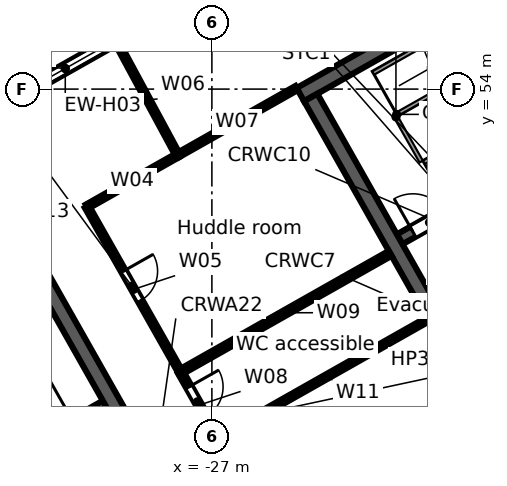
"""IFC4 building model, lengths in metres.
Left out: names, types, materials, properties, quantities, classifications, styles, units other than length and angle.
Written with IfcOpenShell. Run it as: python <this file> out.ifc"""

import sys

from ifc_helpers import new_model, si_unit, direction, frame, frame_2d, origin, place, context, subcontext, project, spatial, rectangle, extrude, element, fill, save


model = new_model("IFC4")
c1 = context("Model", 3, precision=1e-05, world=origin(), true_north=direction((0.0, 1.0)))
c2 = subcontext(c1, "Body", "Model", "MODEL_VIEW")
j1 = project(units=[si_unit("LENGTHUNIT", "METRE"), si_unit("PLANEANGLEUNIT", "RADIAN")], contexts=[c1])
p1 = place(None, origin())
s1 = spatial("IfcSite", under=j1, at=p1, CompositionType="ELEMENT")
p2 = place(p1, origin())
s2 = spatial("IfcBuilding", under=s1, at=p2, CompositionType="ELEMENT")
p3 = place(p2, frame((0.0, 0.0, 281.7)))
s3 = spatial("IfcBuildingStorey", under=s2, at=p3, CompositionType="ELEMENT", Elevation=281.7)
p4 = place(p3, frame((-58.732, 38.771, 0.0), z_axis=(0.0, 0.0, 1.0), x_axis=(0.870355615581, 0.492423702137, 0.0)))
e1 = element("IfcWall", 1, at=p4, inside=s3, PredefinedType="STANDARD", context=c2, shape_type="SweptSolid", body=[
    extrude(rectangle(XDim=64.052, YDim=0.25, at=frame_2d((32.026, 0.0))), origin(), (0.0, 0.0, 1.0), 3.45),
])
p5 = place(p4, frame((61.259, 0.0, 0.8)))
e2 = element("IfcOpeningElement", 2, at=p5, cuts=e1, PredefinedType="OPENING", context=c2, shape_type="SweptSolid", body=[
    extrude(rectangle(XDim=2.4, YDim=2.2, at=frame_2d((1.2, 1.1))), frame((0.0, 0.135, 0.0), z_axis=(0.0, -1.0, 0.0), x_axis=(1.0, 0.0, 0.0)), (0.0, 0.0, 1.0), 0.27),
])
p6 = place(p4, frame((58.216, 0.0, 0.8)))
e3 = element("IfcOpeningElement", 3, at=p6, cuts=e1, PredefinedType="OPENING", context=c2, shape_type="SweptSolid", body=[
    extrude(rectangle(XDim=2.4, YDim=2.2, at=frame_2d((1.2, 1.1))), frame((0.0, 0.135, 0.0), z_axis=(0.0, -1.0, 0.0), x_axis=(1.0, 0.0, 0.0)), (0.0, 0.0, 1.0), 0.27),
])
p7 = place(p4, frame((55.173, 0.0, 0.8)))
e4 = element("IfcOpeningElement", 4, at=p7, cuts=e1, PredefinedType="OPENING", context=c2, shape_type="SweptSolid", body=[
    extrude(rectangle(XDim=2.4, YDim=2.2, at=frame_2d((1.2, 1.1))), frame((0.0, 0.135, 0.0), z_axis=(0.0, -1.0, 0.0), x_axis=(1.0, 0.0, 0.0)), (0.0, 0.0, 1.0), 0.27),
])
p8 = place(p4, frame((52.129, 0.0, 0.8)))
e5 = element("IfcOpeningElement", 5, at=p8, cuts=e1, PredefinedType="OPENING", context=c2, shape_type="SweptSolid", body=[
    extrude(rectangle(XDim=2.4, YDim=2.2, at=frame_2d((1.2, 1.1))), frame((0.0, 0.135, 0.0), z_axis=(0.0, -1.0, 0.0), x_axis=(1.0, 0.0, 0.0)), (0.0, 0.0, 1.0), 0.27),
])
p9 = place(p4, frame((49.086, 0.0, 0.8)))
e6 = element("IfcOpeningElement", 6, at=p9, cuts=e1, PredefinedType="OPENING", context=c2, shape_type="SweptSolid", body=[
    extrude(rectangle(XDim=2.4, YDim=2.2, at=frame_2d((1.2, 1.1))), frame((0.0, 0.135, 0.0), z_axis=(0.0, -1.0, 0.0), x_axis=(1.0, 0.0, 0.0)), (0.0, 0.0, 1.0), 0.27),
])
p10 = place(p4, frame((46.043, 0.0, 0.8)))
e7 = element("IfcOpeningElement", 7, at=p10, cuts=e1, PredefinedType="OPENING", context=c2, shape_type="SweptSolid", body=[
    extrude(rectangle(XDim=2.4, YDim=2.2, at=frame_2d((1.2, 1.1))), frame((0.0, 0.135, 0.0), z_axis=(0.0, -1.0, 0.0), x_axis=(1.0, 0.0, 0.0)), (0.0, 0.0, 1.0), 0.27),
])
p11 = place(p4, frame((43.0, 0.0, 0.8)))
e8 = element("IfcOpeningElement", 8, at=p11, cuts=e1, PredefinedType="OPENING", context=c2, shape_type="SweptSolid", body=[
    extrude(rectangle(XDim=2.4, YDim=2.2, at=frame_2d((1.2, 1.1))), frame((0.0, 0.135, 0.0), z_axis=(0.0, -1.0, 0.0), x_axis=(1.0, 0.0, 0.0)), (0.0, 0.0, 1.0), 0.27),
])
p12 = place(p4, frame((39.956, 0.0, 0.8)))
e9 = element("IfcOpeningElement", 9, at=p12, cuts=e1, PredefinedType="OPENING", context=c2, shape_type="SweptSolid", body=[
    extrude(rectangle(XDim=2.4, YDim=2.2, at=frame_2d((1.2, 1.1))), frame((0.0, 0.135, 0.0), z_axis=(0.0, -1.0, 0.0), x_axis=(1.0, 0.0, 0.0)), (0.0, 0.0, 1.0), 0.27),
])
p13 = place(p4, frame((36.913, 0.0, 0.8)))
e10 = element("IfcOpeningElement", 10, at=p13, cuts=e1, PredefinedType="OPENING", context=c2, shape_type="SweptSolid", body=[
    extrude(rectangle(XDim=2.4, YDim=2.2, at=frame_2d((1.2, 1.1))), frame((0.0, 0.135, 0.0), z_axis=(0.0, -1.0, 0.0), x_axis=(1.0, 0.0, 0.0)), (0.0, 0.0, 1.0), 0.27),
])
p14 = place(p4, frame((33.87, 0.0, 0.8)))
e11 = element("IfcOpeningElement", 11, at=p14, cuts=e1, PredefinedType="OPENING", context=c2, shape_type="SweptSolid", body=[
    extrude(rectangle(XDim=2.4, YDim=2.2, at=frame_2d((1.2, 1.1))), frame((0.0, 0.135, 0.0), z_axis=(0.0, -1.0, 0.0), x_axis=(1.0, 0.0, 0.0)), (0.0, 0.0, 1.0), 0.27),
])
p15 = place(p4, frame((30.826, 0.0, 0.8)))
e12 = element("IfcOpeningElement", 12, at=p15, cuts=e1, PredefinedType="OPENING", context=c2, shape_type="SweptSolid", body=[
    extrude(rectangle(XDim=2.4, YDim=2.2, at=frame_2d((1.2, 1.1))), frame((0.0, 0.135, 0.0), z_axis=(0.0, -1.0, 0.0), x_axis=(1.0, 0.0, 0.0)), (0.0, 0.0, 1.0), 0.27),
])
p16 = place(p4, frame((27.783, 0.0, 0.8)))
e13 = element("IfcOpeningElement", 13, at=p16, cuts=e1, PredefinedType="OPENING", context=c2, shape_type="SweptSolid", body=[
    extrude(rectangle(XDim=2.4, YDim=2.2, at=frame_2d((1.2, 1.1))), frame((0.0, 0.135, 0.0), z_axis=(0.0, -1.0, 0.0), x_axis=(1.0, 0.0, 0.0)), (0.0, 0.0, 1.0), 0.27),
])
p17 = place(p4, frame((24.74, 0.0, 0.8)))
e14 = element("IfcOpeningElement", 14, at=p17, cuts=e1, PredefinedType="OPENING", context=c2, shape_type="SweptSolid", body=[
    extrude(rectangle(XDim=2.4, YDim=2.2, at=frame_2d((1.2, 1.1))), frame((0.0, 0.135, 0.0), z_axis=(0.0, -1.0, 0.0), x_axis=(1.0, 0.0, 0.0)), (0.0, 0.0, 1.0), 0.27),
])
p18 = place(p4, frame((21.696, 0.0, 0.8)))
e15 = element("IfcOpeningElement", 15, at=p18, cuts=e1, PredefinedType="OPENING", context=c2, shape_type="SweptSolid", body=[
    extrude(rectangle(XDim=2.4, YDim=2.2, at=frame_2d((1.2, 1.1))), frame((0.0, 0.135, 0.0), z_axis=(0.0, -1.0, 0.0), x_axis=(1.0, 0.0, 0.0)), (0.0, 0.0, 1.0), 0.27),
])
p19 = place(p4, frame((18.653, 0.0, 0.8)))
e16 = element("IfcOpeningElement", 16, at=p19, cuts=e1, PredefinedType="OPENING", context=c2, shape_type="SweptSolid", body=[
    extrude(rectangle(XDim=2.4, YDim=2.2, at=frame_2d((1.2, 1.1))), frame((0.0, 0.135, 0.0), z_axis=(0.0, -1.0, 0.0), x_axis=(1.0, 0.0, 0.0)), (0.0, 0.0, 1.0), 0.27),
])
p20 = place(p4, frame((15.61, 0.0, 0.8)))
e17 = element("IfcOpeningElement", 17, at=p20, cuts=e1, PredefinedType="OPENING", context=c2, shape_type="SweptSolid", body=[
    extrude(rectangle(XDim=2.4, YDim=2.2, at=frame_2d((1.2, 1.1))), frame((0.0, 0.135, 0.0), z_axis=(0.0, -1.0, 0.0), x_axis=(1.0, 0.0, 0.0)), (0.0, 0.0, 1.0), 0.27),
])
p21 = place(p4, frame((12.567, 0.0, 0.8)))
e18 = element("IfcOpeningElement", 18, at=p21, cuts=e1, PredefinedType="OPENING", context=c2, shape_type="SweptSolid", body=[
    extrude(rectangle(XDim=2.4, YDim=2.2, at=frame_2d((1.2, 1.1))), frame((0.0, 0.135, 0.0), z_axis=(0.0, -1.0, 0.0), x_axis=(1.0, 0.0, 0.0)), (0.0, 0.0, 1.0), 0.27),
])
p22 = place(p4, frame((9.523, 0.0, 0.8)))
e19 = element("IfcOpeningElement", 19, at=p22, cuts=e1, PredefinedType="OPENING", context=c2, shape_type="SweptSolid", body=[
    extrude(rectangle(XDim=2.4, YDim=2.2, at=frame_2d((1.2, 1.1))), frame((0.0, 0.135, 0.0), z_axis=(0.0, -1.0, 0.0), x_axis=(1.0, 0.0, 0.0)), (0.0, 0.0, 1.0), 0.27),
])
p23 = place(p4, frame((6.48, 0.0, 0.8)))
e20 = element("IfcOpeningElement", 20, at=p23, cuts=e1, PredefinedType="OPENING", context=c2, shape_type="SweptSolid", body=[
    extrude(rectangle(XDim=2.4, YDim=2.2, at=frame_2d((1.2, 1.1))), frame((0.0, 0.135, 0.0), z_axis=(0.0, -1.0, 0.0), x_axis=(1.0, 0.0, 0.0)), (0.0, 0.0, 1.0), 0.27),
])
p24 = place(p4, frame((3.437, 0.0, 0.8)))
e21 = element("IfcOpeningElement", 21, at=p24, cuts=e1, PredefinedType="OPENING", context=c2, shape_type="SweptSolid", body=[
    extrude(rectangle(XDim=2.4, YDim=2.2, at=frame_2d((1.2, 1.1))), frame((0.0, 0.135, 0.0), z_axis=(0.0, -1.0, 0.0), x_axis=(1.0, 0.0, 0.0)), (0.0, 0.0, 1.0), 0.27),
])
p25 = place(p4, frame((0.393, 0.0, 0.8)))
e22 = element("IfcOpeningElement", 22, at=p25, cuts=e1, PredefinedType="OPENING", context=c2, shape_type="SweptSolid", body=[
    extrude(rectangle(XDim=2.4, YDim=2.2, at=frame_2d((1.2, 1.1))), frame((0.0, 0.135, 0.0), z_axis=(0.0, -1.0, 0.0), x_axis=(1.0, 0.0, 0.0)), (0.0, 0.0, 1.0), 0.27),
])
p26 = place(p3, frame((-3.017, 46.293, 0.0), z_axis=(0.0, 0.0, 1.0), x_axis=(-0.870355474887, -0.492423950812, 0.0)))
e23 = element("IfcWall", 23, at=p26, inside=s3, PredefinedType="STANDARD", context=c2, shape_type="SweptSolid", body=[
    extrude(rectangle(XDim=40.34, YDim=0.25, at=frame_2d((20.17, 0.0))), origin(), (0.0, 0.0, 1.0), 3.45),
])
p27 = place(p26, frame((37.428, 0.0, 0.8)))
e24 = element("IfcOpeningElement", 24, at=p27, cuts=e23, PredefinedType="OPENING", context=c2, shape_type="SweptSolid", body=[
    extrude(rectangle(XDim=2.4, YDim=2.2, at=frame_2d((1.2, 1.1))), frame((0.0, 0.135, 0.0), z_axis=(0.0, -1.0, 0.0), x_axis=(1.0, 0.0, 0.0)), (0.0, 0.0, 1.0), 0.27),
])
p28 = place(p26, frame((34.372, 0.0, 0.0)))
e25 = element("IfcOpeningElement", 25, at=p28, cuts=e23, PredefinedType="OPENING", context=c2, shape_type="SweptSolid", body=[
    extrude(rectangle(XDim=1.8, YDim=2.4, at=frame_2d((0.9, 1.2))), frame((0.0, 0.135, 0.0), z_axis=(0.0, -1.0, 0.0), x_axis=(1.0, 0.0, 0.0)), (0.0, 0.0, 1.0), 0.27),
])
p29 = place(p26, frame((30.716, 0.0, 0.8)))
e26 = element("IfcOpeningElement", 26, at=p29, cuts=e23, PredefinedType="OPENING", context=c2, shape_type="SweptSolid", body=[
    extrude(rectangle(XDim=2.4, YDim=2.2, at=frame_2d((1.2, 1.1))), frame((0.0, 0.135, 0.0), z_axis=(0.0, -1.0, 0.0), x_axis=(1.0, 0.0, 0.0)), (0.0, 0.0, 1.0), 0.27),
])
p30 = place(p26, frame((27.36, 0.0, 0.8)))
e27 = element("IfcOpeningElement", 27, at=p30, cuts=e23, PredefinedType="OPENING", context=c2, shape_type="SweptSolid", body=[
    extrude(rectangle(XDim=2.4, YDim=2.2, at=frame_2d((1.2, 1.1))), frame((0.0, 0.135, 0.0), z_axis=(0.0, -1.0, 0.0), x_axis=(1.0, 0.0, 0.0)), (0.0, 0.0, 1.0), 0.27),
])
p31 = place(p26, frame((24.304, 0.0, 0.0)))
e28 = element("IfcOpeningElement", 28, at=p31, cuts=e23, PredefinedType="OPENING", context=c2, shape_type="SweptSolid", body=[
    extrude(rectangle(XDim=1.8, YDim=2.4, at=frame_2d((0.9, 1.2))), frame((0.0, 0.135, 0.0), z_axis=(0.0, -1.0, 0.0), x_axis=(1.0, 0.0, 0.0)), (0.0, 0.0, 1.0), 0.27),
])
p32 = place(p26, frame((20.648, 0.0, 0.8)))
e29 = element("IfcOpeningElement", 29, at=p32, cuts=e23, PredefinedType="OPENING", context=c2, shape_type="SweptSolid", body=[
    extrude(rectangle(XDim=2.4, YDim=2.2, at=frame_2d((1.2, 1.1))), frame((0.0, 0.135, 0.0), z_axis=(0.0, -1.0, 0.0), x_axis=(1.0, 0.0, 0.0)), (0.0, 0.0, 1.0), 0.27),
])
p33 = place(p26, frame((17.292, 0.0, 0.8)))
e30 = element("IfcOpeningElement", 30, at=p33, cuts=e23, PredefinedType="OPENING", context=c2, shape_type="SweptSolid", body=[
    extrude(rectangle(XDim=2.4, YDim=2.2, at=frame_2d((1.2, 1.1))), frame((0.0, 0.135, 0.0), z_axis=(0.0, -1.0, 0.0), x_axis=(1.0, 0.0, 0.0)), (0.0, 0.0, 1.0), 0.27),
])
p34 = place(p26, frame((14.236, 0.0, 0.0)))
e31 = element("IfcOpeningElement", 31, at=p34, cuts=e23, PredefinedType="OPENING", context=c2, shape_type="SweptSolid", body=[
    extrude(rectangle(XDim=1.8, YDim=2.4, at=frame_2d((0.9, 1.2))), frame((0.0, 0.135, 0.0), z_axis=(0.0, -1.0, 0.0), x_axis=(1.0, 0.0, 0.0)), (0.0, 0.0, 1.0), 0.27),
])
p35 = place(p26, frame((10.58, 0.0, 0.8)))
e32 = element("IfcOpeningElement", 32, at=p35, cuts=e23, PredefinedType="OPENING", context=c2, shape_type="SweptSolid", body=[
    extrude(rectangle(XDim=2.4, YDim=2.2, at=frame_2d((1.2, 1.1))), frame((0.0, 0.135, 0.0), z_axis=(0.0, -1.0, 0.0), x_axis=(1.0, 0.0, 0.0)), (0.0, 0.0, 1.0), 0.27),
])
p36 = place(p26, frame((7.224, 0.0, 0.8)))
e33 = element("IfcOpeningElement", 33, at=p36, cuts=e23, PredefinedType="OPENING", context=c2, shape_type="SweptSolid", body=[
    extrude(rectangle(XDim=2.4, YDim=2.2, at=frame_2d((1.2, 1.1))), frame((0.0, 0.135, 0.0), z_axis=(0.0, -1.0, 0.0), x_axis=(1.0, 0.0, 0.0)), (0.0, 0.0, 1.0), 0.27),
])
p37 = place(p26, frame((4.168, 0.0, 0.0)))
e34 = element("IfcOpeningElement", 34, at=p37, cuts=e23, PredefinedType="OPENING", context=c2, shape_type="SweptSolid", body=[
    extrude(rectangle(XDim=1.8, YDim=2.4, at=frame_2d((0.9, 1.2))), frame((0.0, 0.135, 0.0), z_axis=(0.0, -1.0, 0.0), x_axis=(1.0, 0.0, 0.0)), (0.0, 0.0, 1.0), 0.27),
])
p38 = place(p26, frame((0.512, 0.0, 0.8)))
e35 = element("IfcOpeningElement", 35, at=p38, cuts=e23, PredefinedType="OPENING", context=c2, shape_type="SweptSolid", body=[
    extrude(rectangle(XDim=2.4, YDim=2.2, at=frame_2d((1.2, 1.1))), frame((0.0, 0.135, 0.0), z_axis=(0.0, -1.0, 0.0), x_axis=(1.0, 0.0, 0.0)), (0.0, 0.0, 1.0), 0.27),
])
p39 = place(p3, frame((-37.282, 41.435, 0.0), z_axis=(0.0, 0.0, 1.0), x_axis=(0.870361315115, 0.492413628113, 0.0)))
e36 = element("IfcWall", 36, at=p39, inside=s3, PredefinedType="SOLIDWALL", context=c2, shape_type="SweptSolid", body=[
    extrude(rectangle(XDim=8.6, YDim=0.3, at=frame_2d((4.3, 0.0))), origin(), (0.0, 0.0, 1.0), 3.45),
])
p40 = place(p39, frame((0.65, 0.0, 0.0)))
e37 = element("IfcOpeningElement", 37, at=p40, cuts=e36, PredefinedType="OPENING", context=c2, shape_type="SweptSolid", body=[
    extrude(rectangle(XDim=1.1, YDim=2.1, at=frame_2d((0.55, 1.05))), frame((0.0, 0.16, 0.0), z_axis=(0.0, -1.0, 0.0), x_axis=(1.0, 0.0, 0.0)), (0.0, 0.0, 1.0), 0.32),
])
p41 = place(p39, frame((3.05, 0.0, 0.0)))
e38 = element("IfcOpeningElement", 38, at=p41, cuts=e36, PredefinedType="OPENING", context=c2, shape_type="SweptSolid", body=[
    extrude(rectangle(XDim=1.1, YDim=2.1, at=frame_2d((0.55, 1.05))), frame((0.0, 0.16, 0.0), z_axis=(0.0, -1.0, 0.0), x_axis=(1.0, 0.0, 0.0)), (0.0, 0.0, 1.0), 0.32),
])
p42 = place(p39, frame((6.2, 0.0, 0.0)))
e39 = element("IfcOpeningElement", 39, at=p42, cuts=e36, PredefinedType="OPENING", context=c2, shape_type="SweptSolid", body=[
    extrude(rectangle(XDim=1.1, YDim=2.1, at=frame_2d((0.55, 1.05))), frame((0.0, 0.16, 0.0), z_axis=(0.0, -1.0, 0.0), x_axis=(1.0, 0.0, 0.0)), (0.0, 0.0, 1.0), 0.32),
])
p43 = place(p3, frame((-31.79, 49.597, 0.0), z_axis=(0.0, 0.0, 1.0), x_axis=(0.492421663121, -0.870356769198, 0.0)))
e40 = element("IfcWall", 40, at=p43, inside=s3, PredefinedType="SOLIDWALL", context=c2, shape_type="SweptSolid", body=[
    extrude(rectangle(XDim=13.2, YDim=0.4, at=frame_2d((6.6, 0.0))), origin(), (0.0, 0.0, 1.0), 3.45),
])
p44 = place(p3, frame((-22.059, 50.047, 0.0), z_axis=(0.0, 0.0, 1.0), x_axis=(0.87035077051, 0.49243226567, 0.0)))
e41 = element("IfcWall", 41, at=p44, inside=s3, PredefinedType="SOLIDWALL", context=c2, shape_type="SweptSolid", body=[
    extrude(rectangle(XDim=7.4, YDim=0.3, at=frame_2d((3.7, 0.0))), origin(), (0.0, 0.0, 1.0), 3.45),
])
p45 = place(p44, frame((0.4, 0.0, 0.0)))
e42 = element("IfcOpeningElement", 42, at=p45, cuts=e41, PredefinedType="OPENING", context=c2, shape_type="SweptSolid", body=[
    extrude(rectangle(XDim=1.0, YDim=2.1, at=frame_2d((0.5, 1.05))), frame((0.0, 0.16, 0.0), z_axis=(0.0, -1.0, 0.0), x_axis=(1.0, 0.0, 0.0)), (0.0, 0.0, 1.0), 0.32),
])
p46 = place(p3, frame((-24.672, 53.854, 0.0), z_axis=(0.0, 0.0, 1.0), x_axis=(0.870353598469, 0.492427267353, 0.0)))
e43 = element("IfcWall", 43, at=p46, inside=s3, PredefinedType="SOLIDWALL", context=c2, shape_type="SweptSolid", body=[
    extrude(rectangle(XDim=15.0, YDim=0.4, at=frame_2d((7.5, 0.0))), origin(), (0.0, 0.0, 1.0), 3.45),
])
p47 = place(p3, frame((-24.4, 53.779, 0.0), z_axis=(0.0, 0.0, 1.0), x_axis=(0.492421663121, -0.870356769198, 0.0)))
e44 = element("IfcWall", 44, at=p47, inside=s3, PredefinedType="SOLIDWALL", context=c2, shape_type="SweptSolid", body=[
    extrude(rectangle(XDim=13.2, YDim=0.4, at=frame_2d((6.6, 0.0))), origin(), (0.0, 0.0, 1.0), 3.45),
])
p48 = place(p3, frame((-30.289, 50.906, 0.0), z_axis=(0.0, 0.0, 1.0), x_axis=(0.870344460795, 0.492443417626, 0.0)))
e45 = element("IfcWall", 45, at=p48, inside=s3, PredefinedType="PARTITIONING", context=c2, shape_type="SweptSolid", body=[
    extrude(rectangle(XDim=2.75, YDim=0.125, at=frame_2d((1.375, 0.0))), origin(), (0.0, 0.0, 1.0), 3.45),
])
p49 = place(p3, frame((-30.289, 50.906, 0.0), z_axis=(0.0, 0.0, 1.0), x_axis=(0.492406341242, -0.870365437678, 0.0)))
e46 = element("IfcWall", 46, at=p49, inside=s3, PredefinedType="PARTITIONING", context=c2, shape_type="SweptSolid", body=[
    extrude(rectangle(XDim=5.0, YDim=0.125, at=frame_2d((2.5, 0.0))), origin(), (0.0, 0.0, 1.0), 3.45),
])
p50 = place(p49, frame((1.95, 0.0, 0.0)))
e47 = element("IfcOpeningElement", 47, at=p50, cuts=e46, PredefinedType="OPENING", context=c2, shape_type="SweptSolid", body=[
    extrude(rectangle(XDim=0.9, YDim=2.1, at=frame_2d((0.45, 1.05))), frame((0.0, 0.073, 0.0), z_axis=(0.0, -1.0, 0.0), x_axis=(1.0, 0.0, 0.0)), (0.0, 0.0, 1.0), 0.145),
])
p51 = place(p3, frame((-29.474, 55.181, 0.0), z_axis=(0.0, 0.0, 1.0), x_axis=(0.475344759365, -0.879799613403, 0.0)))
e48 = element("IfcWall", 48, at=p51, inside=s3, PredefinedType="PARTITIONING", context=c2, shape_type="SweptSolid", body=[
    extrude(rectangle(XDim=3.32, YDim=0.125, at=frame_2d((1.66, 0.0))), origin(), (0.0, 0.0, 1.0), 2.73),
])
p52 = place(p3, frame((-27.896, 52.26, 0.0), z_axis=(0.0, 0.0, 1.0), x_axis=(0.870352535776, 0.492429145632, 0.0)))
e49 = element("IfcWall", 49, at=p52, inside=s3, PredefinedType="PARTITIONING", context=c2, shape_type="SweptSolid", body=[
    extrude(rectangle(XDim=3.591, YDim=0.125, at=frame_2d((1.795, 0.0))), origin(), (0.0, 0.0, 1.0), 2.622),
])
p53 = place(p3, frame((-27.827, 46.554, 0.0), z_axis=(0.0, 0.0, 1.0), x_axis=(0.492374954878, -0.870383193662, 0.0)))
e50 = element("IfcWall", 50, at=p53, inside=s3, PredefinedType="PARTITIONING", context=c2, shape_type="SweptSolid", body=[
    extrude(rectangle(XDim=2.0, YDim=0.15, at=frame_2d((1.0, 0.0))), origin(), (0.0, 0.0, 1.0), 2.622),
])
p54 = place(p53, frame((0.45, 0.0, 0.0)))
e51 = element("IfcOpeningElement", 51, at=p54, cuts=e50, PredefinedType="OPENING", context=c2, shape_type="SweptSolid", body=[
    extrude(rectangle(XDim=0.9, YDim=2.1, at=frame_2d((0.45, 1.05))), frame((0.0, 0.085, 0.0), z_axis=(0.0, -1.0, 0.0), x_axis=(1.0, 0.0, 0.0)), (0.0, 0.0, 1.0), 0.17),
])
p55 = place(p3, frame((-27.827, 46.554, 0.0), z_axis=(0.0, 0.0, 1.0), x_axis=(0.870339695563, 0.492451839602, 0.0)))
e52 = element("IfcWall", 52, at=p55, inside=s3, PredefinedType="PARTITIONING", context=c2, shape_type="SweptSolid", body=[
    extrude(rectangle(XDim=6.34, YDim=0.15, at=frame_2d((3.17, 0.0))), origin(), (0.0, 0.0, 1.0), 2.622),
])
p56 = place(p3, frame((-26.842, 44.813, 0.0), z_axis=(0.0, 0.0, 1.0), x_axis=(0.870283015025, 0.492552001071, 0.0)))
e53 = element("IfcWall", 53, at=p56, inside=s3, PredefinedType="PARTITIONING", context=c2, shape_type="SweptSolid", body=[
    extrude(rectangle(XDim=6.341, YDim=0.125, at=frame_2d((3.17, 0.0))), origin(), (0.0, 0.0, 1.0), 2.622),
])
p57 = place(p15, origin())
e54 = element("IfcWindow", 54, at=p57, inside=s3, PartitioningType="SINGLE_PANEL", PredefinedType="WINDOW", context=c2, shape_type="SweptSolid", body=[
    extrude(rectangle(XDim=2.4, YDim=2.2, at=frame_2d((1.2, 1.1))), frame((0.0, 0.03, 0.0), z_axis=(0.0, -1.0, 0.0), x_axis=(1.0, 0.0, 0.0)), (0.0, 0.0, 1.0), 0.06),
])
fill(e12, e54)
p58 = place(p45, origin())
e55 = element("IfcDoor", 55, at=p58, inside=s3, OperationType="SINGLE_SWING_LEFT", PredefinedType="DOOR", context=c2, shape_type="SweptSolid", body=[
    extrude(rectangle(XDim=1.0, YDim=2.1, at=frame_2d((0.5, 1.05))), frame((0.0, 0.025, 0.0), z_axis=(0.0, -1.0, 0.0), x_axis=(1.0, 0.0, 0.0)), (0.0, 0.0, 1.0), 0.05),
])
fill(e42, e55)
p59 = place(p50, origin())
e56 = element("IfcDoor", 56, at=p59, inside=s3, OperationType="SINGLE_SWING_LEFT", PredefinedType="DOOR", context=c2, shape_type="SweptSolid", body=[
    extrude(rectangle(XDim=0.9, YDim=2.1, at=frame_2d((0.45, 1.05))), frame((0.0, 0.025, 0.0), z_axis=(0.0, -1.0, 0.0), x_axis=(1.0, 0.0, 0.0)), (0.0, 0.0, 1.0), 0.05),
])
fill(e47, e56)
p60 = place(p54, origin())
e57 = element("IfcDoor", 57, at=p60, inside=s3, OperationType="SINGLE_SWING_LEFT", PredefinedType="DOOR", context=c2, shape_type="SweptSolid", body=[
    extrude(rectangle(XDim=0.9, YDim=2.1, at=frame_2d((0.45, 1.05))), frame((0.0, 0.025, 0.0), z_axis=(0.0, -1.0, 0.0), x_axis=(1.0, 0.0, 0.0)), (0.0, 0.0, 1.0), 0.05),
])
fill(e51, e57)
save(model, sys.argv[1])
